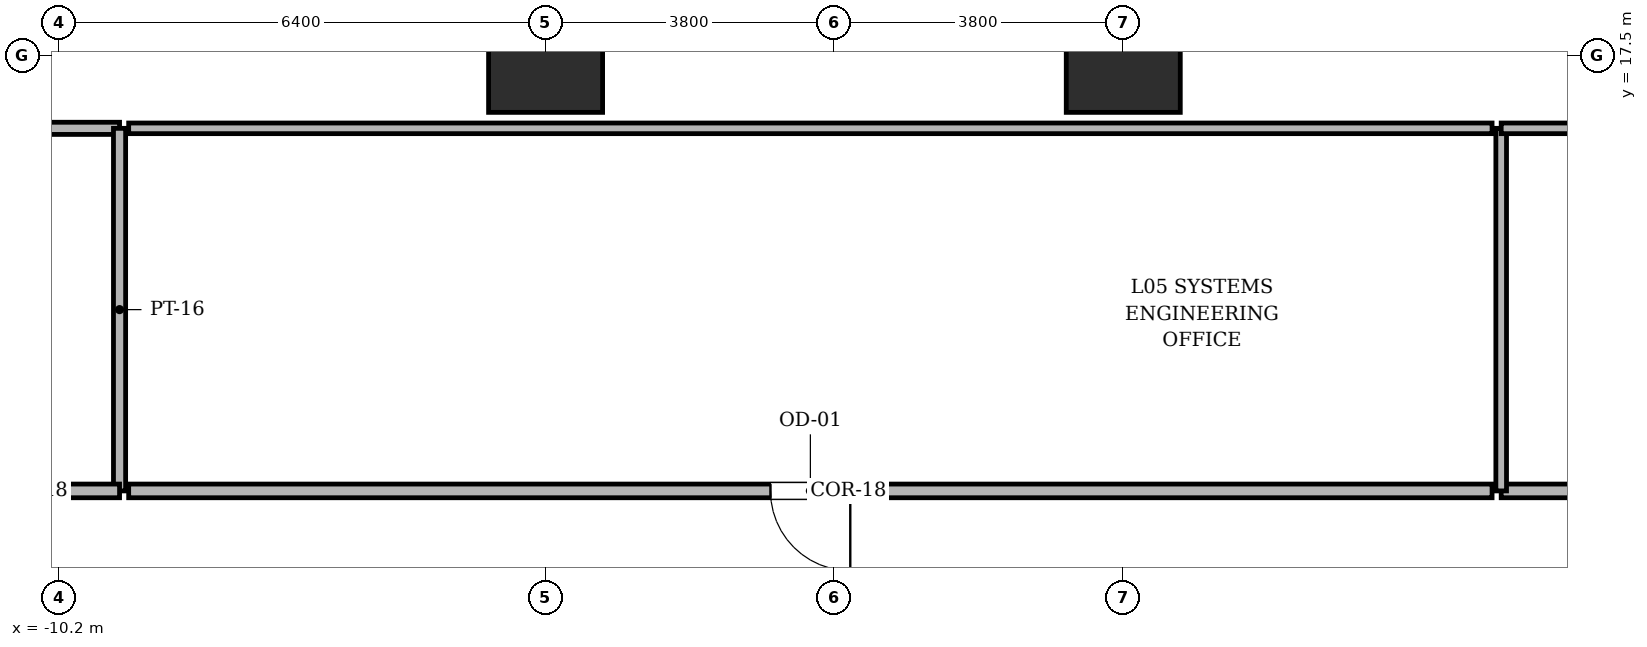
"""IFC4 building model, lengths in metres.
Left out: names, types, materials, properties, quantities, classifications, styles, units other than length and angle.
Written with IfcOpenShell. Run it as: python <this file> out.ifc"""

import sys

from ifc_helpers import new_model, si_unit, direction, frame, frame_2d, origin, origin_2d, place, context, subcontext, project, spatial, rectangle, hollow_rectangle, extrude, element, fill, save


model = new_model("IFC4")
c1 = context("Model", 3, precision=1e-05, world=origin(), true_north=direction((0.0, 1.0)))
c2 = subcontext(c1, "Body", "Model", "MODEL_VIEW")
j1 = project(units=[si_unit("LENGTHUNIT", "METRE"), si_unit("PLANEANGLEUNIT", "RADIAN")], contexts=[c1])
p1 = place(None, origin())
s1 = spatial("IfcSite", under=j1, at=p1, CompositionType="ELEMENT")
p2 = place(p1, origin())
s2 = spatial("IfcBuilding", under=s1, at=p2, CompositionType="ELEMENT")
p3 = place(p2, frame((0.0, 0.0, 28.2)))
s3 = spatial("IfcBuildingStorey", under=s2, at=p3, CompositionType="ELEMENT", Elevation=28.2)
for number, where, z_axis, x_axis in (
    (1, (3.8, 17.5, 0.0), (0.0, 0.0, 1.0), (1.0, 0.0, 0.0)),
    (2, (-3.8, 17.5, 0.0), (0.0, 0.0, 1.0), (1.0, 0.0, 0.0)),
):
    element("IfcColumn", number, at=place(p3, frame(where, z_axis=z_axis, x_axis=x_axis)), inside=s3, PredefinedType="COLUMN", context=c2, shape_type="SweptSolid", body=[
        extrude(hollow_rectangle(XDim=1.5, YDim=1.5, WallThickness=0.045, at=origin_2d()), origin(), (0.0, 0.0, 1.0), 4.05),
    ])
p4 = place(p3, frame((-24.04, 16.54, 0.0), z_axis=(0.0, 0.0, 1.0), x_axis=(1.0, 0.0, 0.0)))
e3 = element("IfcWall", 3, at=p4, inside=s3, PredefinedType="PARTITIONING", context=c2, shape_type="SweptSolid", body=[
    extrude(rectangle(XDim=14.635, YDim=0.16, at=frame_2d((7.317, 0.0))), origin(), (0.0, 0.0, 1.0), 3.104),
])
p5 = place(p3, frame((-9.405, 16.54, 0.0), z_axis=(0.0, 0.0, 1.0), x_axis=(0.0, -1.0, 0.0)))
e4 = element("IfcWall", 4, at=p5, inside=s3, PredefinedType="PARTITIONING", context=c2, shape_type="SweptSolid", body=[
    extrude(rectangle(XDim=4.77, YDim=0.16, at=frame_2d((2.385, 0.0))), origin(), (0.0, 0.0, 1.0), 3.81),
])
p6 = place(p3, frame((-9.405, 11.77, 0.0), z_axis=(0.0, 0.0, 1.0), x_axis=(-1.0, 0.0, 0.0)))
e5 = element("IfcWall", 5, at=p6, inside=s3, PredefinedType="PARTITIONING", context=c2, shape_type="SweptSolid", body=[
    extrude(rectangle(XDim=3.365, YDim=0.18, at=frame_2d((1.683, 0.0))), origin(), (0.0, 0.0, 1.0), 3.104),
])
p7 = place(p6, frame((1.157, 0.0, 0.0)))
e6 = element("IfcOpeningElement", 6, at=p7, cuts=e5, PredefinedType="OPENING", context=c2, shape_type="SweptSolid", body=[
    extrude(rectangle(XDim=1.05, YDim=2.2, at=frame_2d((0.525, 1.1))), frame((0.0, 0.1, 0.0), z_axis=(0.0, -1.0, 0.0), x_axis=(1.0, 0.0, 0.0)), (0.0, 0.0, 1.0), 0.2),
])
p8 = place(p3, frame((12.77, 11.77, 0.0), z_axis=(0.0, 0.0, 1.0), x_axis=(-1.0, 0.0, 0.0)))
e7 = element("IfcWall", 7, at=p8, inside=s3, PredefinedType="PARTITIONING", context=c2, shape_type="SweptSolid", body=[
    extrude(rectangle(XDim=3.998, YDim=0.18, at=frame_2d((1.999, 0.0))), origin(), (0.0, 0.0, 1.0), 3.104),
])
p9 = place(p8, frame((1.474, 0.0, 0.0)))
e8 = element("IfcOpeningElement", 8, at=p9, cuts=e7, PredefinedType="OPENING", context=c2, shape_type="SweptSolid", body=[
    extrude(rectangle(XDim=1.05, YDim=2.2, at=frame_2d((0.525, 1.1))), frame((0.0, 0.1, 0.0), z_axis=(0.0, -1.0, 0.0), x_axis=(1.0, 0.0, 0.0)), (0.0, 0.0, 1.0), 0.2),
])
p10 = place(p3, frame((8.772, 11.77, 0.0), z_axis=(0.0, 0.0, 1.0), x_axis=(0.0, 1.0, 0.0)))
e9 = element("IfcWall", 9, at=p10, inside=s3, PredefinedType="PARTITIONING", context=c2, shape_type="SweptSolid", body=[
    extrude(rectangle(XDim=4.77, YDim=0.14, at=frame_2d((2.385, 0.0))), origin(), (0.0, 0.0, 1.0), 3.81),
])
p11 = place(p3, frame((8.772, 16.54, 0.0), z_axis=(0.0, 0.0, 1.0), x_axis=(1.0, 0.0, 0.0)))
e10 = element("IfcWall", 10, at=p11, inside=s3, PredefinedType="PARTITIONING", context=c2, shape_type="SweptSolid", body=[
    extrude(rectangle(XDim=9.368, YDim=0.14, at=frame_2d((4.684, 0.0))), origin(), (0.0, 0.0, 1.0), 3.104),
])
p12 = place(p3, frame((8.652, 11.77, 0.0), z_axis=(0.0, 0.0, 1.0), x_axis=(-1.0, 0.0, 0.0)))
e11 = element("IfcWall", 11, at=p12, inside=s3, PredefinedType="PARTITIONING", context=c2, shape_type="SweptSolid", body=[
    extrude(rectangle(XDim=17.937, YDim=0.18, at=frame_2d((8.969, 0.0))), origin(), (0.0, 0.0, 1.0), 3.104),
])
p13 = place(p12, frame((8.444, 0.0, 0.0)))
e12 = element("IfcOpeningElement", 12, at=p13, cuts=e11, PredefinedType="OPENING", context=c2, shape_type="SweptSolid", body=[
    extrude(rectangle(XDim=1.05, YDim=2.2, at=frame_2d((0.525, 1.1))), frame((0.0, 0.1, 0.0), z_axis=(0.0, -1.0, 0.0), x_axis=(1.0, 0.0, 0.0)), (0.0, 0.0, 1.0), 0.2),
])
p14 = place(p3, frame((-9.285, 16.54, 0.0), z_axis=(0.0, 0.0, 1.0), x_axis=(1.0, 0.0, 0.0)))
e13 = element("IfcWall", 13, at=p14, inside=s3, PredefinedType="PARTITIONING", context=c2, shape_type="SweptSolid", body=[
    extrude(rectangle(XDim=17.937, YDim=0.14, at=frame_2d((8.969, 0.0))), origin(), (0.0, 0.0, 1.0), 3.104),
])
p15 = place(p13, origin())
e14 = element("IfcDoor", 14, at=p15, inside=s3, OperationType="SINGLE_SWING_LEFT", PredefinedType="DOOR", context=c2, shape_type="SweptSolid", body=[
    extrude(rectangle(XDim=1.05, YDim=2.2, at=frame_2d((0.525, 1.1))), frame((0.0, 0.025, 0.0), z_axis=(0.0, -1.0, 0.0), x_axis=(1.0, 0.0, 0.0)), (0.0, 0.0, 1.0), 0.05),
])
fill(e12, e14)
save(model, sys.argv[1])
